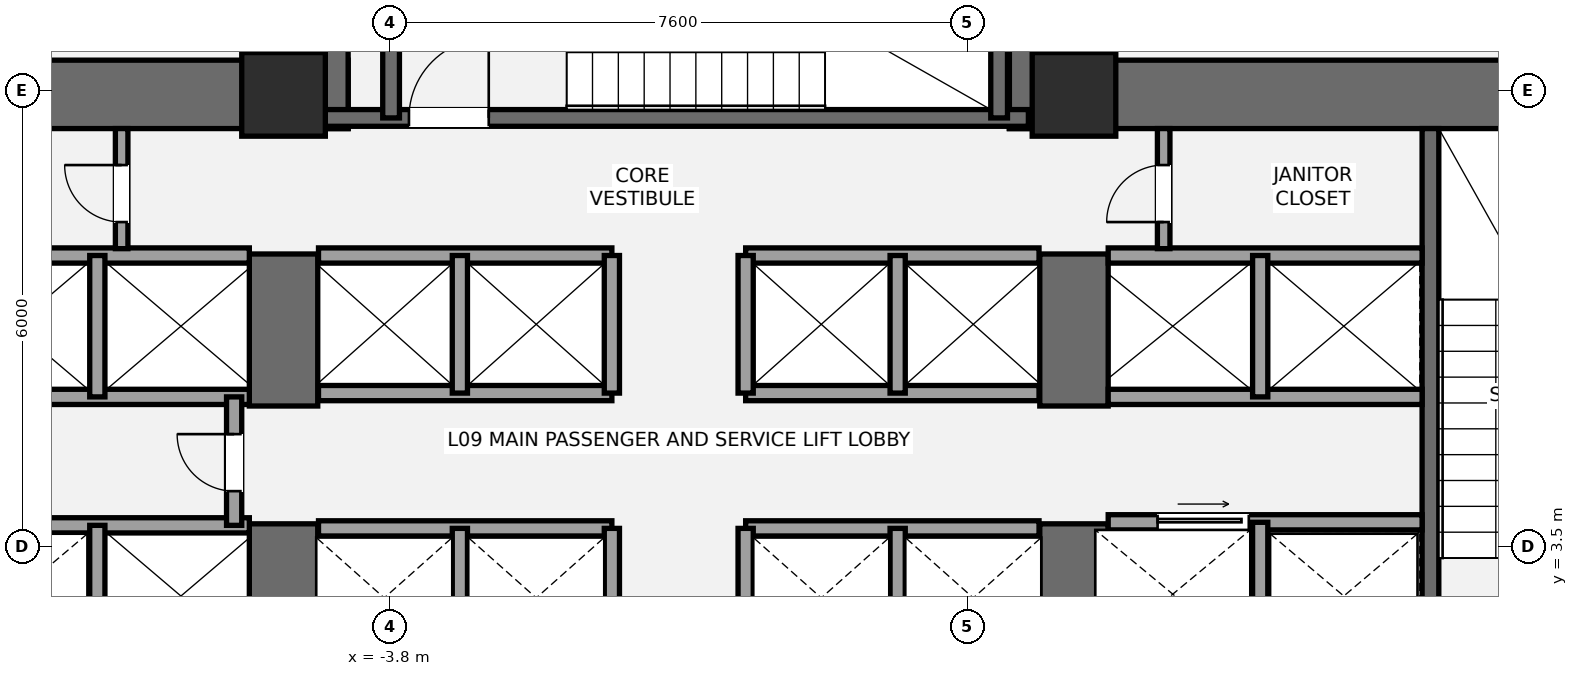
"""IFC4 building model, lengths in metres.
Left out: names, types, materials, properties, quantities, classifications, styles, units other than length and angle.
Written with IfcOpenShell. Run it as: python <this file> out.ifc"""

import sys

from ifc_helpers import new_model, si_unit, direction, frame, frame_2d, origin, origin_2d, place, context, subcontext, project, spatial, rectangle, extrude, element, fill, save


model = new_model("IFC4")
c1 = context("Model", 3, precision=1e-05, world=origin(), true_north=direction((0.0, 1.0)))
c2 = subcontext(c1, "Body", "Model", "MODEL_VIEW")
j1 = project(units=[si_unit("LENGTHUNIT", "METRE"), si_unit("PLANEANGLEUNIT", "RADIAN")], contexts=[c1])
p1 = place(None, origin())
s1 = spatial("IfcSite", under=j1, at=p1, CompositionType="ELEMENT")
p2 = place(p1, origin())
s2 = spatial("IfcBuilding", under=s1, at=p2, CompositionType="ELEMENT")
p3 = place(p2, frame((0.0, 0.0, 37.8)))
s3 = spatial("IfcBuildingStorey", under=s2, at=p3, CompositionType="ELEMENT", Elevation=37.8)
p4 = place(p3, frame((-14.05, 9.45, 0.0), z_axis=(0.0, 0.0, 1.0), x_axis=(1.0, 0.0, 0.0)))
e1 = element("IfcWall", 1, at=p4, inside=s3, PredefinedType="SHEAR", context=c2, shape_type="SweptSolid", body=[
    extrude(rectangle(XDim=9.7, YDim=0.9, at=frame_2d((4.85, 0.0))), origin(), (0.0, 0.0, 1.0), 3.6),
])
p5 = place(p3, frame((-5.2, 0.95, 0.0), z_axis=(0.0, 0.0, 1.0), x_axis=(0.0, 1.0, 0.0)))
e2 = element("IfcWall", 2, at=p5, inside=s3, PredefinedType="SHEAR", context=c2, shape_type="SweptSolid", body=[
    extrude(rectangle(XDim=2.85, YDim=0.9, at=frame_2d((1.425, 0.0))), origin(), (0.0, 0.0, 1.0), 3.6),
])
p6 = place(p3, frame((-5.2, 5.35, 0.0), z_axis=(0.0, 0.0, 1.0), x_axis=(0.0, 1.0, 0.0)))
e3 = element("IfcWall", 3, at=p6, inside=s3, PredefinedType="SHEAR", context=c2, shape_type="SweptSolid", body=[
    extrude(rectangle(XDim=2.0, YDim=0.9, at=frame_2d((1.0, 0.0))), origin(), (0.0, 0.0, 1.0), 3.6),
])
p7 = place(p3, frame((4.35, 9.45, 0.0), z_axis=(0.0, 0.0, 1.0), x_axis=(1.0, 0.0, 0.0)))
e4 = element("IfcWall", 4, at=p7, inside=s3, PredefinedType="SHEAR", context=c2, shape_type="SweptSolid", body=[
    extrude(rectangle(XDim=9.7, YDim=0.9, at=frame_2d((4.85, 0.0))), origin(), (0.0, 0.0, 1.0), 3.6),
])
p8 = place(p3, frame((5.2, 0.95, 0.0), z_axis=(0.0, 0.0, 1.0), x_axis=(0.0, 1.0, 0.0)))
e5 = element("IfcWall", 5, at=p8, inside=s3, PredefinedType="SHEAR", context=c2, shape_type="SweptSolid", body=[
    extrude(rectangle(XDim=2.85, YDim=0.9, at=frame_2d((1.425, 0.0))), origin(), (0.0, 0.0, 1.0), 3.6),
])
p9 = place(p3, frame((5.2, 5.35, 0.0), z_axis=(0.0, 0.0, 1.0), x_axis=(0.0, 1.0, 0.0)))
e6 = element("IfcWall", 6, at=p9, inside=s3, PredefinedType="SHEAR", context=c2, shape_type="SweptSolid", body=[
    extrude(rectangle(XDim=2.0, YDim=0.9, at=frame_2d((1.0, 0.0))), origin(), (0.0, 0.0, 1.0), 3.6),
])
p10 = place(p3, frame((9.89, 1.85, 0.0), z_axis=(0.0, 0.0, 1.0), x_axis=(0.0, 1.0, 0.0)))
e7 = element("IfcWall", 7, at=p10, inside=s3, PredefinedType="SHEAR", context=c2, shape_type="SweptSolid", body=[
    extrude(rectangle(XDim=7.15, YDim=0.22, at=frame_2d((3.575, 0.0))), origin(), (0.0, 0.0, 1.0), 3.6),
])
for number, where, z_axis, x_axis in (
    (8, (-4.8, 9.0, 0.0), (0.0, 0.0, 1.0), (0.0, 1.0, 0.0)),
    (9, (4.8, 9.0, 0.0), (0.0, 0.0, 1.0), (0.0, 1.0, 0.0)),
):
    element("IfcWall", number, at=place(p3, frame(where, z_axis=z_axis, x_axis=x_axis)), inside=s3, PredefinedType="SHEAR", context=c2, shape_type="SweptSolid", body=[
        extrude(rectangle(XDim=4.3, YDim=0.9, at=frame_2d((2.15, 0.0))), origin(), (0.0, 0.0, 1.0), 3.6),
    ])
p11 = place(p3, frame((-4.7, 9.14, 0.0), z_axis=(0.0, 0.0, 1.0), x_axis=(1.0, 0.0, 0.0)))
e10 = element("IfcWall", 10, at=p11, inside=s3, PredefinedType="SHEAR", context=c2, shape_type="SweptSolid", body=[
    extrude(rectangle(XDim=9.3, YDim=0.22, at=frame_2d((4.65, 0.0))), origin(), (0.0, 0.0, 1.0), 3.6),
])
p12 = place(p11, frame((1.15, 0.0, 0.0)))
e11 = element("IfcOpeningElement", 11, at=p12, cuts=e10, PredefinedType="OPENING", context=c2, shape_type="SweptSolid", body=[
    extrude(rectangle(XDim=1.05, YDim=2.15, at=frame_2d((0.525, 1.075))), frame((0.0, 0.12, 0.0), z_axis=(0.0, -1.0, 0.0), x_axis=(1.0, 0.0, 0.0)), (0.0, 0.0, 1.0), 0.24),
])
for number, where, z_axis, x_axis in (
    (12, (-3.785, 9.14, 0.0), (0.0, 0.0, 1.0), (0.0, 1.0, 0.0)),
    (13, (4.215, 9.14, 0.0), (0.0, 0.0, 1.0), (0.0, 1.0, 0.0)),
):
    element("IfcWall", number, at=place(p3, frame(where, z_axis=z_axis, x_axis=x_axis)), inside=s3, PredefinedType="SHEAR", context=c2, shape_type="SweptSolid", body=[
        extrude(rectangle(XDim=3.26, YDim=0.22, at=frame_2d((1.63, 0.0))), origin(), (0.0, 0.0, 1.0), 3.6),
    ])
for number, where, z_axis, x_axis in (
    (14, (-5.2, 9.45, 0.0), (0.0, 0.0, 1.0), (1.0, 0.0, 0.0)),
    (15, (5.2, 9.45, 0.0), (0.0, 0.0, 1.0), (1.0, 0.0, 0.0)),
):
    element("IfcColumn", number, at=place(p3, frame(where, z_axis=z_axis, x_axis=x_axis)), inside=s3, PredefinedType="COLUMN", context=c2, shape_type="SweptSolid", body=[
        extrude(rectangle(XDim=1.1, YDim=1.1, at=origin_2d()), origin(), (0.0, 0.0, 1.0), 3.6),
    ])
p13 = place(p3, frame((-9.78, 3.78, 0.0), z_axis=(0.0, 0.0, 1.0), x_axis=(1.0, 0.0, 0.0)))
e16 = element("IfcWall", 16, at=p13, inside=s3, PredefinedType="SOLIDWALL", context=c2, shape_type="SweptSolid", body=[
    extrude(rectangle(XDim=4.13, YDim=0.2, at=frame_2d((2.065, 0.0))), origin(), (0.0, 0.0, 1.0), 3.4),
])
p14 = place(p3, frame((-7.65, 1.85, 0.0), z_axis=(0.0, 0.0, 1.0), x_axis=(0.0, 1.0, 0.0)))
e17 = element("IfcWall", 17, at=p14, inside=s3, PredefinedType="SOLIDWALL", context=c2, shape_type="SweptSolid", body=[
    extrude(rectangle(XDim=1.93, YDim=0.2, at=frame_2d((0.965, 0.0))), origin(), (0.0, 0.0, 1.0), 3.4),
])
for number, where, z_axis, x_axis in (
    (18, (-9.78, 5.47, 0.0), (0.0, 0.0, 1.0), (1.0, 0.0, 0.0)),
    (19, (-9.78, 7.33, 0.0), (0.0, 0.0, 1.0), (1.0, 0.0, 0.0)),
):
    element("IfcWall", number, at=place(p3, frame(where, z_axis=z_axis, x_axis=x_axis)), inside=s3, PredefinedType="SOLIDWALL", context=c2, shape_type="SweptSolid", body=[
        extrude(rectangle(XDim=4.13, YDim=0.2, at=frame_2d((2.065, 0.0))), origin(), (0.0, 0.0, 1.0), 3.4),
    ])
p15 = place(p3, frame((-7.65, 5.47, 0.0), z_axis=(0.0, 0.0, 1.0), x_axis=(0.0, 1.0, 0.0)))
e20 = element("IfcWall", 20, at=p15, inside=s3, PredefinedType="SOLIDWALL", context=c2, shape_type="SweptSolid", body=[
    extrude(rectangle(XDim=1.86, YDim=0.2, at=frame_2d((0.93, 0.0))), origin(), (0.0, 0.0, 1.0), 3.4),
])
p16 = place(p3, frame((-5.85, 3.78, 0.0), z_axis=(0.0, 0.0, 1.0), x_axis=(0.0, 1.0, 0.0)))
e21 = element("IfcWall", 21, at=p16, inside=s3, PredefinedType="SOLIDWALL", context=c2, shape_type="SweptSolid", body=[
    extrude(rectangle(XDim=1.69, YDim=0.2, at=frame_2d((0.845, 0.0))), origin(), (0.0, 0.0, 1.0), 3.4),
])
p17 = place(p16, frame((0.45, 0.0, 0.0)))
e22 = element("IfcOpeningElement", 22, at=p17, cuts=e21, PredefinedType="OPENING", context=c2, shape_type="SweptSolid", body=[
    extrude(rectangle(XDim=0.75, YDim=2.1, at=frame_2d((0.375, 1.05))), frame((0.0, 0.11, 0.0), z_axis=(0.0, -1.0, 0.0), x_axis=(1.0, 0.0, 0.0)), (0.0, 0.0, 1.0), 0.22),
])
p18 = place(p3, frame((5.65, 3.82, 0.0), z_axis=(0.0, 0.0, 1.0), x_axis=(1.0, 0.0, 0.0)))
e23 = element("IfcWall", 23, at=p18, inside=s3, PredefinedType="SOLIDWALL", context=c2, shape_type="SweptSolid", body=[
    extrude(rectangle(XDim=4.13, YDim=0.2, at=frame_2d((2.065, 0.0))), origin(), (0.0, 0.0, 1.0), 3.4),
])
p19 = place(p18, frame((0.65, 0.0, 0.0)))
e24 = element("IfcOpeningElement", 24, at=p19, cuts=e23, PredefinedType="OPENING", context=c2, shape_type="SweptSolid", body=[
    extrude(rectangle(XDim=1.2, YDim=2.2, at=frame_2d((0.6, 1.1))), frame((0.0, 0.11, 0.0), z_axis=(0.0, -1.0, 0.0), x_axis=(1.0, 0.0, 0.0)), (0.0, 0.0, 1.0), 0.22),
])
p20 = place(p3, frame((7.65, 1.85, 0.0), z_axis=(0.0, 0.0, 1.0), x_axis=(0.0, 1.0, 0.0)))
e25 = element("IfcWall", 25, at=p20, inside=s3, PredefinedType="SOLIDWALL", context=c2, shape_type="SweptSolid", body=[
    extrude(rectangle(XDim=1.97, YDim=0.2, at=frame_2d((0.985, 0.0))), origin(), (0.0, 0.0, 1.0), 3.4),
])
for number, where, z_axis, x_axis in (
    (26, (5.65, 5.47, 0.0), (0.0, 0.0, 1.0), (1.0, 0.0, 0.0)),
    (27, (5.65, 7.33, 0.0), (0.0, 0.0, 1.0), (1.0, 0.0, 0.0)),
):
    element("IfcWall", number, at=place(p3, frame(where, z_axis=z_axis, x_axis=x_axis)), inside=s3, PredefinedType="SOLIDWALL", context=c2, shape_type="SweptSolid", body=[
        extrude(rectangle(XDim=4.13, YDim=0.2, at=frame_2d((2.065, 0.0))), origin(), (0.0, 0.0, 1.0), 3.4),
    ])
p21 = place(p3, frame((7.65, 5.47, 0.0), z_axis=(0.0, 0.0, 1.0), x_axis=(0.0, 1.0, 0.0)))
e28 = element("IfcWall", 28, at=p21, inside=s3, PredefinedType="SOLIDWALL", context=c2, shape_type="SweptSolid", body=[
    extrude(rectangle(XDim=1.86, YDim=0.2, at=frame_2d((0.93, 0.0))), origin(), (0.0, 0.0, 1.0), 3.4),
])
for number, where, z_axis, x_axis in (
    (29, (-4.74, 3.74, 0.0), (0.0, 0.0, 1.0), (1.0, 0.0, 0.0)),
    (30, (0.88, 3.74, 0.0), (0.0, 0.0, 1.0), (1.0, 0.0, 0.0)),
):
    element("IfcWall", number, at=place(p3, frame(where, z_axis=z_axis, x_axis=x_axis)), inside=s3, PredefinedType="SOLIDWALL", context=c2, shape_type="SweptSolid", body=[
        extrude(rectangle(XDim=3.86, YDim=0.2, at=frame_2d((1.93, 0.0))), origin(), (0.0, 0.0, 1.0), 3.4),
    ])
for number, where, z_axis, x_axis in (
    (31, (-2.88, 1.92, 0.0), (0.0, 0.0, 1.0), (0.0, 1.0, 0.0)),
    (32, (2.88, 1.92, 0.0), (0.0, 0.0, 1.0), (0.0, 1.0, 0.0)),
    (33, (-0.88, 1.92, 0.0), (0.0, 0.0, 1.0), (0.0, 1.0, 0.0)),
    (34, (0.88, 1.92, 0.0), (0.0, 0.0, 1.0), (0.0, 1.0, 0.0)),
):
    element("IfcWall", number, at=place(p3, frame(where, z_axis=z_axis, x_axis=x_axis)), inside=s3, PredefinedType="SOLIDWALL", context=c2, shape_type="SweptSolid", body=[
        extrude(rectangle(XDim=1.82, YDim=0.2, at=frame_2d((0.91, 0.0))), origin(), (0.0, 0.0, 1.0), 3.4),
    ])
for number, where, z_axis, x_axis in (
    (35, (-4.74, 5.52, 0.0), (0.0, 0.0, 1.0), (1.0, 0.0, 0.0)),
    (36, (0.88, 5.52, 0.0), (0.0, 0.0, 1.0), (1.0, 0.0, 0.0)),
    (37, (-4.74, 7.33, 0.0), (0.0, 0.0, 1.0), (1.0, 0.0, 0.0)),
    (38, (0.88, 7.33, 0.0), (0.0, 0.0, 1.0), (1.0, 0.0, 0.0)),
):
    element("IfcWall", number, at=place(p3, frame(where, z_axis=z_axis, x_axis=x_axis)), inside=s3, PredefinedType="SOLIDWALL", context=c2, shape_type="SweptSolid", body=[
        extrude(rectangle(XDim=3.86, YDim=0.2, at=frame_2d((1.93, 0.0))), origin(), (0.0, 0.0, 1.0), 3.4),
    ])
for number, where, z_axis, x_axis in (
    (39, (-2.88, 5.52, 0.0), (0.0, 0.0, 1.0), (0.0, 1.0, 0.0)),
    (40, (2.88, 5.52, 0.0), (0.0, 0.0, 1.0), (0.0, 1.0, 0.0)),
    (41, (-0.88, 5.52, 0.0), (0.0, 0.0, 1.0), (0.0, 1.0, 0.0)),
    (42, (0.88, 5.52, 0.0), (0.0, 0.0, 1.0), (0.0, 1.0, 0.0)),
):
    element("IfcWall", number, at=place(p3, frame(where, z_axis=z_axis, x_axis=x_axis)), inside=s3, PredefinedType="SOLIDWALL", context=c2, shape_type="SweptSolid", body=[
        extrude(rectangle(XDim=1.81, YDim=0.2, at=frame_2d((0.905, 0.0))), origin(), (0.0, 0.0, 1.0), 3.4),
    ])
p22 = place(p3, frame((-7.33, 7.42, 0.0), z_axis=(0.0, 0.0, 1.0), x_axis=(0.0, 1.0, 0.0)))
e43 = element("IfcWall", 43, at=p22, inside=s3, PredefinedType="PARTITIONING", context=c2, shape_type="SweptSolid", body=[
    extrude(rectangle(XDim=1.58, YDim=0.165, at=frame_2d((0.79, 0.0))), origin(), (0.0, 0.0, 1.0), 3.4),
])
p23 = place(p22, frame((0.35, 0.0, 0.0)))
e44 = element("IfcOpeningElement", 44, at=p23, cuts=e43, PredefinedType="OPENING", context=c2, shape_type="SweptSolid", body=[
    extrude(rectangle(XDim=0.75, YDim=2.1, at=frame_2d((0.375, 1.05))), frame((0.0, 0.093, 0.0), z_axis=(0.0, -1.0, 0.0), x_axis=(1.0, 0.0, 0.0)), (0.0, 0.0, 1.0), 0.185),
])
p24 = place(p3, frame((6.38, 7.42, 0.0), z_axis=(0.0, 0.0, 1.0), x_axis=(0.0, 1.0, 0.0)))
e45 = element("IfcWall", 45, at=p24, inside=s3, PredefinedType="PARTITIONING", context=c2, shape_type="SweptSolid", body=[
    extrude(rectangle(XDim=1.58, YDim=0.165, at=frame_2d((0.79, 0.0))), origin(), (0.0, 0.0, 1.0), 3.4),
])
p25 = place(p24, frame((0.35, 0.0, 0.0)))
e46 = element("IfcOpeningElement", 46, at=p25, cuts=e45, PredefinedType="OPENING", context=c2, shape_type="SweptSolid", body=[
    extrude(rectangle(XDim=0.75, YDim=2.1, at=frame_2d((0.375, 1.05))), frame((0.0, 0.093, 0.0), z_axis=(0.0, -1.0, 0.0), x_axis=(1.0, 0.0, 0.0)), (0.0, 0.0, 1.0), 0.185),
])
p26 = place(p12, origin())
e47 = element("IfcDoor", 47, at=p26, inside=s3, OperationType="SINGLE_SWING_RIGHT", PredefinedType="DOOR", context=c2, shape_type="SweptSolid", body=[
    extrude(rectangle(XDim=1.05, YDim=2.15, at=frame_2d((0.525, 1.075))), frame((0.0, 0.025, 0.0), z_axis=(0.0, -1.0, 0.0), x_axis=(1.0, 0.0, 0.0)), (0.0, 0.0, 1.0), 0.05),
])
fill(e11, e47)
p27 = place(p17, origin())
e48 = element("IfcDoor", 48, at=p27, inside=s3, OperationType="SINGLE_SWING_RIGHT", PredefinedType="DOOR", context=c2, shape_type="SweptSolid", body=[
    extrude(rectangle(XDim=0.75, YDim=2.1, at=frame_2d((0.375, 1.05))), frame((0.0, 0.025, 0.0), z_axis=(0.0, -1.0, 0.0), x_axis=(1.0, 0.0, 0.0)), (0.0, 0.0, 1.0), 0.05),
])
fill(e22, e48)
p28 = place(p19, origin())
e49 = element("IfcDoor", 49, at=p28, inside=s3, OperationType="SLIDING_TO_RIGHT", PredefinedType="DOOR", context=c2, shape_type="SweptSolid", body=[
    extrude(rectangle(XDim=1.2, YDim=2.2, at=frame_2d((0.6, 1.1))), frame((0.0, 0.025, 0.0), z_axis=(0.0, -1.0, 0.0), x_axis=(1.0, 0.0, 0.0)), (0.0, 0.0, 1.0), 0.05),
])
fill(e24, e49)
p29 = place(p23, origin())
e50 = element("IfcDoor", 50, at=p29, inside=s3, OperationType="SINGLE_SWING_RIGHT", PredefinedType="DOOR", context=c2, shape_type="SweptSolid", body=[
    extrude(rectangle(XDim=0.75, YDim=2.1, at=frame_2d((0.375, 1.05))), frame((0.0, 0.025, 0.0), z_axis=(0.0, -1.0, 0.0), x_axis=(1.0, 0.0, 0.0)), (0.0, 0.0, 1.0), 0.05),
])
fill(e44, e50)
p30 = place(p25, origin())
e51 = element("IfcDoor", 51, at=p30, inside=s3, OperationType="SINGLE_SWING_LEFT", PredefinedType="DOOR", context=c2, shape_type="SweptSolid", body=[
    extrude(rectangle(XDim=0.75, YDim=2.1, at=frame_2d((0.375, 1.05))), frame((0.0, 0.025, 0.0), z_axis=(0.0, -1.0, 0.0), x_axis=(1.0, 0.0, 0.0)), (0.0, 0.0, 1.0), 0.05),
])
fill(e46, e51)
save(model, sys.argv[1])
